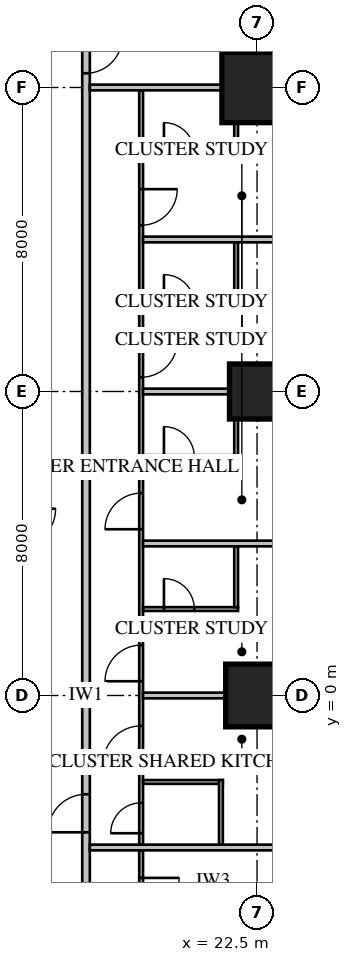
"""IFC4 building model, lengths in metres.
Left out: names, types, materials, properties, quantities, classifications, styles, units other than length and angle.
Written with IfcOpenShell. Run it as: python <this file> out.ifc"""

import sys

from ifc_helpers import new_model, si_unit, direction, frame, frame_2d, origin, origin_2d, place, context, subcontext, project, spatial, rectangle, extrude, element, fill, save


model = new_model("IFC4")
c1 = context("Model", 3, precision=1e-05, world=origin(), true_north=direction((0.0, 1.0)))
c2 = subcontext(c1, "Body", "Model", "MODEL_VIEW")
j1 = project(units=[si_unit("LENGTHUNIT", "METRE"), si_unit("PLANEANGLEUNIT", "RADIAN")], contexts=[c1])
p1 = place(None, origin())
s1 = spatial("IfcSite", under=j1, at=p1, CompositionType="ELEMENT")
p2 = place(p1, origin())
s2 = spatial("IfcBuilding", under=s1, at=p2, CompositionType="ELEMENT")
p3 = place(p2, frame((0.0, 0.0, 46.8)))
s3 = spatial("IfcBuildingStorey", under=s2, at=p3, CompositionType="ELEMENT", Elevation=46.8)
p4 = place(p3, frame((22.5, 0.0, 0.0), z_axis=(0.0, 0.0, 1.0), x_axis=(1.0, 0.0, 0.0)))
e1 = element("IfcColumn", 1, at=p4, inside=s3, PredefinedType="COLUMN", context=c2, shape_type="SweptSolid", body=[
    extrude(rectangle(XDim=1.65, YDim=1.65, at=origin_2d()), origin(), (0.0, 0.0, 1.0), 3.85),
])
p5 = place(p3, frame((22.5, 8.0, 0.0), z_axis=(0.0, 0.0, 1.0), x_axis=(1.0, 0.0, 0.0)))
e2 = element("IfcColumn", 2, at=p5, inside=s3, PredefinedType="COLUMN", context=c2, shape_type="SweptSolid", body=[
    extrude(rectangle(XDim=1.45, YDim=1.45, at=origin_2d()), origin(), (0.0, 0.0, 1.0), 3.85),
])
p6 = place(p3, frame((22.5, 16.0, 0.0), z_axis=(0.0, 0.0, 1.0), x_axis=(1.0, 0.0, 0.0)))
e3 = element("IfcColumn", 3, at=p6, inside=s3, PredefinedType="COLUMN", context=c2, shape_type="SweptSolid", body=[
    extrude(rectangle(XDim=1.85, YDim=1.85, at=origin_2d()), origin(), (0.0, 0.0, 1.0), 3.85),
])
p7 = place(p3, frame((18.0, -18.0, 0.0), z_axis=(0.0, 0.0, 1.0), x_axis=(0.0, 1.0, 0.0)))
e4 = element("IfcWall", 4, at=p7, inside=s3, PredefinedType="PARTITIONING", context=c2, shape_type="SweptSolid", body=[
    extrude(rectangle(XDim=36.0, YDim=0.2, at=frame_2d((18.0, 0.0))), origin(), (0.0, 0.0, 1.0), 3.65),
])
p8 = place(p7, frame((10.4, 0.0, 0.0)))
e5 = element("IfcOpeningElement", 5, at=p8, cuts=e4, PredefinedType="OPENING", context=c2, shape_type="SweptSolid", body=[
    extrude(rectangle(XDim=1.0, YDim=2.1, at=frame_2d((0.5, 1.05))), frame((0.0, 0.12, 0.0), z_axis=(0.0, -1.0, 0.0), x_axis=(1.0, 0.0, 0.0)), (0.0, 0.0, 1.0), 0.24),
])
p9 = place(p7, frame((14.4, 0.0, 0.0)))
e6 = element("IfcOpeningElement", 6, at=p9, cuts=e4, PredefinedType="OPENING", context=c2, shape_type="SweptSolid", body=[
    extrude(rectangle(XDim=1.0, YDim=2.1, at=frame_2d((0.5, 1.05))), frame((0.0, 0.12, 0.0), z_axis=(0.0, -1.0, 0.0), x_axis=(1.0, 0.0, 0.0)), (0.0, 0.0, 1.0), 0.24),
])
p10 = place(p7, frame((0.375, 0.0, 0.0)))
e7 = element("IfcOpeningElement", 7, at=p10, cuts=e4, PredefinedType="OPENING", context=c2, shape_type="SweptSolid", body=[
    extrude(rectangle(XDim=1.0, YDim=2.1, at=frame_2d((0.5, 1.05))), frame((0.0, 0.12, 0.0), z_axis=(0.0, -1.0, 0.0), x_axis=(1.0, 0.0, 0.0)), (0.0, 0.0, 1.0), 0.24),
])
p11 = place(p7, frame((34.375, 0.0, 0.0)))
e8 = element("IfcOpeningElement", 8, at=p11, cuts=e4, PredefinedType="OPENING", context=c2, shape_type="SweptSolid", body=[
    extrude(rectangle(XDim=0.95, YDim=2.1, at=frame_2d((0.475, 1.05))), frame((0.0, 0.12, 0.0), z_axis=(0.0, -1.0, 0.0), x_axis=(1.0, 0.0, 0.0)), (0.0, 0.0, 1.0), 0.24),
])
p12 = place(p3, frame((19.45, -15.925, 0.0), z_axis=(0.0, 0.0, 1.0), x_axis=(0.0, 1.0, 0.0)))
e9 = element("IfcWall", 9, at=p12, inside=s3, PredefinedType="PARTITIONING", context=c2, shape_type="SweptSolid", body=[
    extrude(rectangle(XDim=11.85, YDim=0.1, at=frame_2d((5.925, 0.0))), origin(), (0.0, 0.0, 1.0), 3.65),
])
p13 = place(p12, frame((10.125, 0.0, 0.0)))
e10 = element("IfcOpeningElement", 10, at=p13, cuts=e9, PredefinedType="OPENING", context=c2, shape_type="SweptSolid", body=[
    extrude(rectangle(XDim=1.0, YDim=2.1, at=frame_2d((0.5, 1.05))), frame((0.0, 0.07, 0.0), z_axis=(0.0, -1.0, 0.0), x_axis=(1.0, 0.0, 0.0)), (0.0, 0.0, 1.0), 0.14),
])
p14 = place(p12, frame((8.3, 0.0, 0.0)))
e11 = element("IfcOpeningElement", 11, at=p14, cuts=e9, PredefinedType="OPENING", context=c2, shape_type="SweptSolid", body=[
    extrude(rectangle(XDim=0.8, YDim=2.1, at=frame_2d((0.4, 1.05))), frame((0.0, 0.07, 0.0), z_axis=(0.0, -1.0, 0.0), x_axis=(1.0, 0.0, 0.0)), (0.0, 0.0, 1.0), 0.14),
])
p15 = place(p12, frame((0.3, 0.0, 0.0)))
e12 = element("IfcOpeningElement", 12, at=p15, cuts=e9, PredefinedType="OPENING", context=c2, shape_type="SweptSolid", body=[
    extrude(rectangle(XDim=0.95, YDim=2.1, at=frame_2d((0.475, 1.05))), frame((0.0, 0.07, 0.0), z_axis=(0.0, -1.0, 0.0), x_axis=(1.0, 0.0, 0.0)), (0.0, 0.0, 1.0), 0.14),
])
p16 = place(p12, frame((4.3, 0.0, 0.0)))
e13 = element("IfcOpeningElement", 13, at=p16, cuts=e9, PredefinedType="OPENING", context=c2, shape_type="SweptSolid", body=[
    extrude(rectangle(XDim=0.95, YDim=2.1, at=frame_2d((0.475, 1.05))), frame((0.0, 0.07, 0.0), z_axis=(0.0, -1.0, 0.0), x_axis=(1.0, 0.0, 0.0)), (0.0, 0.0, 1.0), 0.14),
])
p17 = place(p3, frame((19.45, -3.925, 0.0), z_axis=(0.0, 0.0, 1.0), x_axis=(0.0, 1.0, 0.0)))
e14 = element("IfcWall", 14, at=p17, inside=s3, PredefinedType="PARTITIONING", context=c2, shape_type="SweptSolid", body=[
    extrude(rectangle(XDim=19.85, YDim=0.1, at=frame_2d((9.925, 0.0))), origin(), (0.0, 0.0, 1.0), 3.65),
])
p18 = place(p17, frame((2.125, 0.0, 0.0)))
e15 = element("IfcOpeningElement", 15, at=p18, cuts=e14, PredefinedType="OPENING", context=c2, shape_type="SweptSolid", body=[
    extrude(rectangle(XDim=1.0, YDim=2.1, at=frame_2d((0.5, 1.05))), frame((0.0, 0.07, 0.0), z_axis=(0.0, -1.0, 0.0), x_axis=(1.0, 0.0, 0.0)), (0.0, 0.0, 1.0), 0.14),
])
p19 = place(p17, frame((0.3, 0.0, 0.0)))
e16 = element("IfcOpeningElement", 16, at=p19, cuts=e14, PredefinedType="OPENING", context=c2, shape_type="SweptSolid", body=[
    extrude(rectangle(XDim=0.8, YDim=2.1, at=frame_2d((0.4, 1.05))), frame((0.0, 0.07, 0.0), z_axis=(0.0, -1.0, 0.0), x_axis=(1.0, 0.0, 0.0)), (0.0, 0.0, 1.0), 0.14),
])
p20 = place(p17, frame((4.3, 0.0, 0.0)))
e17 = element("IfcOpeningElement", 17, at=p20, cuts=e14, PredefinedType="OPENING", context=c2, shape_type="SweptSolid", body=[
    extrude(rectangle(XDim=0.95, YDim=2.1, at=frame_2d((0.475, 1.05))), frame((0.0, 0.07, 0.0), z_axis=(0.0, -1.0, 0.0), x_axis=(1.0, 0.0, 0.0)), (0.0, 0.0, 1.0), 0.14),
])
p21 = place(p17, frame((8.3, 0.0, 0.0)))
e18 = element("IfcOpeningElement", 18, at=p21, cuts=e14, PredefinedType="OPENING", context=c2, shape_type="SweptSolid", body=[
    extrude(rectangle(XDim=0.95, YDim=2.1, at=frame_2d((0.475, 1.05))), frame((0.0, 0.07, 0.0), z_axis=(0.0, -1.0, 0.0), x_axis=(1.0, 0.0, 0.0)), (0.0, 0.0, 1.0), 0.14),
])
p22 = place(p17, frame((12.3, 0.0, 0.0)))
e19 = element("IfcOpeningElement", 19, at=p22, cuts=e14, PredefinedType="OPENING", context=c2, shape_type="SweptSolid", body=[
    extrude(rectangle(XDim=0.95, YDim=2.1, at=frame_2d((0.475, 1.05))), frame((0.0, 0.07, 0.0), z_axis=(0.0, -1.0, 0.0), x_axis=(1.0, 0.0, 0.0)), (0.0, 0.0, 1.0), 0.14),
])
p23 = place(p17, frame((16.3, 0.0, 0.0)))
e20 = element("IfcOpeningElement", 20, at=p23, cuts=e14, PredefinedType="OPENING", context=c2, shape_type="SweptSolid", body=[
    extrude(rectangle(XDim=0.95, YDim=2.1, at=frame_2d((0.475, 1.05))), frame((0.0, 0.07, 0.0), z_axis=(0.0, -1.0, 0.0), x_axis=(1.0, 0.0, 0.0)), (0.0, 0.0, 1.0), 0.14),
])
p24 = place(p3, frame((19.5, -2.275, 0.0), z_axis=(0.0, 0.0, 1.0), x_axis=(1.0, 0.0, 0.0)))
e21 = element("IfcWall", 21, at=p24, inside=s3, PredefinedType="PARTITIONING", context=c2, shape_type="SweptSolid", body=[
    extrude(rectangle(XDim=2.1, YDim=0.1, at=frame_2d((1.05, 0.0))), origin(), (0.0, 0.0, 1.0), 3.65),
])
p25 = place(p3, frame((21.55, -3.925, 0.0), z_axis=(0.0, 0.0, 1.0), x_axis=(0.0, 1.0, 0.0)))
e22 = element("IfcWall", 22, at=p25, inside=s3, PredefinedType="PARTITIONING", context=c2, shape_type="SweptSolid", body=[
    extrude(rectangle(XDim=1.7, YDim=0.1, at=frame_2d((0.85, 0.0))), origin(), (0.0, 0.0, 1.0), 3.65),
])
p26 = place(p3, frame((18.1, -4.0, 0.0), z_axis=(0.0, 0.0, 1.0), x_axis=(1.0, 0.0, 0.0)))
e23 = element("IfcWall", 23, at=p26, inside=s3, PredefinedType="PARTITIONING", context=c2, shape_type="SweptSolid", body=[
    extrude(rectangle(XDim=6.6, YDim=0.15, at=frame_2d((3.3, 0.0))), origin(), (0.0, 0.0, 1.0), 3.65),
])
p27 = place(p3, frame((19.5, 0.0, 0.0), z_axis=(0.0, 0.0, 1.0), x_axis=(1.0, 0.0, 0.0)))
e24 = element("IfcWall", 24, at=p27, inside=s3, PredefinedType="PARTITIONING", context=c2, shape_type="SweptSolid", body=[
    extrude(rectangle(XDim=5.2, YDim=0.15, at=frame_2d((2.6, 0.0))), origin(), (0.0, 0.0, 1.0), 2.957),
])
for number, where, z_axis, x_axis in (
    (25, (19.5, 4.0, 0.0), (0.0, 0.0, 1.0), (1.0, 0.0, 0.0)),
    (26, (19.5, 8.0, 0.0), (0.0, 0.0, 1.0), (1.0, 0.0, 0.0)),
    (27, (19.5, 12.0, 0.0), (0.0, 0.0, 1.0), (1.0, 0.0, 0.0)),
):
    element("IfcWall", number, at=place(p3, frame(where, z_axis=z_axis, x_axis=x_axis)), inside=s3, PredefinedType="PARTITIONING", context=c2, shape_type="SweptSolid", body=[
        extrude(rectangle(XDim=5.2, YDim=0.15, at=frame_2d((2.6, 0.0))), origin(), (0.0, 0.0, 1.0), 3.65),
    ])
p28 = place(p3, frame((18.1, 16.0, 0.0), z_axis=(0.0, 0.0, 1.0), x_axis=(1.0, 0.0, 0.0)))
e28 = element("IfcWall", 28, at=p28, inside=s3, PredefinedType="PARTITIONING", context=c2, shape_type="SweptSolid", body=[
    extrude(rectangle(XDim=6.589, YDim=0.15, at=frame_2d((3.295, 0.0))), origin(), (0.0, 0.0, 1.0), 3.65),
])
p29 = place(p3, frame((19.5, 2.275, 0.0), z_axis=(0.0, 0.0, 1.0), x_axis=(1.0, 0.0, 0.0)))
e29 = element("IfcWall", 29, at=p29, inside=s3, PredefinedType="PARTITIONING", context=c2, shape_type="SweptSolid", body=[
    extrude(rectangle(XDim=2.5, YDim=0.1, at=frame_2d((1.25, 0.0))), origin(), (0.0, 0.0, 1.0), 3.65),
])
p30 = place(p29, frame((0.55, 0.0, 0.0)))
e30 = element("IfcOpeningElement", 30, at=p30, cuts=e29, PredefinedType="OPENING", context=c2, shape_type="SweptSolid", body=[
    extrude(rectangle(XDim=0.8, YDim=2.1, at=frame_2d((0.4, 1.05))), frame((0.0, 0.07, 0.0), z_axis=(0.0, -1.0, 0.0), x_axis=(1.0, 0.0, 0.0)), (0.0, 0.0, 1.0), 0.14),
])
p31 = place(p3, frame((21.95, 2.325, 0.0), z_axis=(0.0, 0.0, 1.0), x_axis=(0.0, 1.0, 0.0)))
e31 = element("IfcWall", 31, at=p31, inside=s3, PredefinedType="PARTITIONING", context=c2, shape_type="SweptSolid", body=[
    extrude(rectangle(XDim=1.6, YDim=0.1, at=frame_2d((0.8, 0.0))), origin(), (0.0, 0.0, 1.0), 3.65),
])
p32 = place(p3, frame((19.5, 6.275, 0.0), z_axis=(0.0, 0.0, 1.0), x_axis=(1.0, 0.0, 0.0)))
e32 = element("IfcWall", 32, at=p32, inside=s3, PredefinedType="PARTITIONING", context=c2, shape_type="SweptSolid", body=[
    extrude(rectangle(XDim=2.5, YDim=0.1, at=frame_2d((1.25, 0.0))), origin(), (0.0, 0.0, 1.0), 3.65),
])
p33 = place(p32, frame((0.55, 0.0, 0.0)))
e33 = element("IfcOpeningElement", 33, at=p33, cuts=e32, PredefinedType="OPENING", context=c2, shape_type="SweptSolid", body=[
    extrude(rectangle(XDim=0.8, YDim=2.1, at=frame_2d((0.4, 1.05))), frame((0.0, 0.07, 0.0), z_axis=(0.0, -1.0, 0.0), x_axis=(1.0, 0.0, 0.0)), (0.0, 0.0, 1.0), 0.14),
])
p34 = place(p3, frame((21.95, 6.325, 0.0), z_axis=(0.0, 0.0, 1.0), x_axis=(0.0, 1.0, 0.0)))
e34 = element("IfcWall", 34, at=p34, inside=s3, PredefinedType="PARTITIONING", context=c2, shape_type="SweptSolid", body=[
    extrude(rectangle(XDim=1.6, YDim=0.1, at=frame_2d((0.8, 0.0))), origin(), (0.0, 0.0, 1.0), 3.65),
])
p35 = place(p3, frame((19.5, 10.275, 0.0), z_axis=(0.0, 0.0, 1.0), x_axis=(1.0, 0.0, 0.0)))
e35 = element("IfcWall", 35, at=p35, inside=s3, PredefinedType="PARTITIONING", context=c2, shape_type="SweptSolid", body=[
    extrude(rectangle(XDim=2.5, YDim=0.1, at=frame_2d((1.25, 0.0))), origin(), (0.0, 0.0, 1.0), 3.65),
])
p36 = place(p35, frame((0.55, 0.0, 0.0)))
e36 = element("IfcOpeningElement", 36, at=p36, cuts=e35, PredefinedType="OPENING", context=c2, shape_type="SweptSolid", body=[
    extrude(rectangle(XDim=0.8, YDim=2.1, at=frame_2d((0.4, 1.05))), frame((0.0, 0.07, 0.0), z_axis=(0.0, -1.0, 0.0), x_axis=(1.0, 0.0, 0.0)), (0.0, 0.0, 1.0), 0.14),
])
p37 = place(p3, frame((21.95, 10.325, 0.0), z_axis=(0.0, 0.0, 1.0), x_axis=(0.0, 1.0, 0.0)))
e37 = element("IfcWall", 37, at=p37, inside=s3, PredefinedType="PARTITIONING", context=c2, shape_type="SweptSolid", body=[
    extrude(rectangle(XDim=1.6, YDim=0.1, at=frame_2d((0.8, 0.0))), origin(), (0.0, 0.0, 1.0), 3.65),
])
p38 = place(p3, frame((19.5, 14.275, 0.0), z_axis=(0.0, 0.0, 1.0), x_axis=(1.0, 0.0, 0.0)))
e38 = element("IfcWall", 38, at=p38, inside=s3, PredefinedType="PARTITIONING", context=c2, shape_type="SweptSolid", body=[
    extrude(rectangle(XDim=2.5, YDim=0.1, at=frame_2d((1.25, 0.0))), origin(), (0.0, 0.0, 1.0), 3.65),
])
p39 = place(p38, frame((0.55, 0.0, 0.0)))
e39 = element("IfcOpeningElement", 39, at=p39, cuts=e38, PredefinedType="OPENING", context=c2, shape_type="SweptSolid", body=[
    extrude(rectangle(XDim=0.8, YDim=2.1, at=frame_2d((0.4, 1.05))), frame((0.0, 0.07, 0.0), z_axis=(0.0, -1.0, 0.0), x_axis=(1.0, 0.0, 0.0)), (0.0, 0.0, 1.0), 0.14),
])
p40 = place(p3, frame((21.95, 14.325, 0.0), z_axis=(0.0, 0.0, 1.0), x_axis=(0.0, 1.0, 0.0)))
e40 = element("IfcWall", 40, at=p40, inside=s3, PredefinedType="PARTITIONING", context=c2, shape_type="SweptSolid", body=[
    extrude(rectangle(XDim=1.6, YDim=0.1, at=frame_2d((0.8, 0.0))), origin(), (0.0, 0.0, 1.0), 3.65),
])
p41 = place(p13, origin())
e41 = element("IfcDoor", 41, at=p41, inside=s3, OperationType="SINGLE_SWING_RIGHT", PredefinedType="DOOR", context=c2, shape_type="SweptSolid", body=[
    extrude(rectangle(XDim=1.0, YDim=2.1, at=frame_2d((0.5, 1.05))), frame((0.0, 0.025, 0.0), z_axis=(0.0, -1.0, 0.0), x_axis=(1.0, 0.0, 0.0)), (0.0, 0.0, 1.0), 0.05),
])
fill(e10, e41)
p42 = place(p9, origin())
e42 = element("IfcDoor", 42, at=p42, inside=s3, OperationType="SINGLE_SWING_LEFT", PredefinedType="DOOR", context=c2, shape_type="SweptSolid", body=[
    extrude(rectangle(XDim=1.0, YDim=2.1, at=frame_2d((0.5, 1.05))), frame((0.0, 0.025, 0.0), z_axis=(0.0, -1.0, 0.0), x_axis=(1.0, 0.0, 0.0)), (0.0, 0.0, 1.0), 0.05),
])
fill(e6, e42)
p43 = place(p18, origin())
e43 = element("IfcDoor", 43, at=p43, inside=s3, OperationType="SINGLE_SWING_LEFT", PredefinedType="DOOR", context=c2, shape_type="SweptSolid", body=[
    extrude(rectangle(XDim=1.0, YDim=2.1, at=frame_2d((0.5, 1.05))), frame((0.0, 0.025, 0.0), z_axis=(0.0, -1.0, 0.0), x_axis=(1.0, 0.0, 0.0)), (0.0, 0.0, 1.0), 0.05),
])
fill(e15, e43)
p44 = place(p19, origin())
e44 = element("IfcDoor", 44, at=p44, inside=s3, OperationType="SINGLE_SWING_LEFT", PredefinedType="DOOR", context=c2, shape_type="SweptSolid", body=[
    extrude(rectangle(XDim=0.8, YDim=2.1, at=frame_2d((0.4, 1.05))), frame((0.0, 0.025, 0.0), z_axis=(0.0, -1.0, 0.0), x_axis=(1.0, 0.0, 0.0)), (0.0, 0.0, 1.0), 0.05),
])
fill(e16, e44)
p45 = place(p20, origin())
e45 = element("IfcDoor", 45, at=p45, inside=s3, OperationType="SINGLE_SWING_LEFT", PredefinedType="DOOR", context=c2, shape_type="SweptSolid", body=[
    extrude(rectangle(XDim=0.95, YDim=2.1, at=frame_2d((0.475, 1.05))), frame((0.0, 0.025, 0.0), z_axis=(0.0, -1.0, 0.0), x_axis=(1.0, 0.0, 0.0)), (0.0, 0.0, 1.0), 0.05),
])
fill(e17, e45)
p46 = place(p30, origin())
e46 = element("IfcDoor", 46, at=p46, inside=s3, OperationType="SINGLE_SWING_LEFT", PredefinedType="DOOR", context=c2, shape_type="SweptSolid", body=[
    extrude(rectangle(XDim=0.8, YDim=2.1, at=frame_2d((0.4, 1.05))), frame((0.0, 0.025, 0.0), z_axis=(0.0, -1.0, 0.0), x_axis=(1.0, 0.0, 0.0)), (0.0, 0.0, 1.0), 0.05),
])
fill(e30, e46)
p47 = place(p21, origin())
e47 = element("IfcDoor", 47, at=p47, inside=s3, OperationType="SINGLE_SWING_LEFT", PredefinedType="DOOR", context=c2, shape_type="SweptSolid", body=[
    extrude(rectangle(XDim=0.95, YDim=2.1, at=frame_2d((0.475, 1.05))), frame((0.0, 0.025, 0.0), z_axis=(0.0, -1.0, 0.0), x_axis=(1.0, 0.0, 0.0)), (0.0, 0.0, 1.0), 0.05),
])
fill(e18, e47)
p48 = place(p33, origin())
e48 = element("IfcDoor", 48, at=p48, inside=s3, OperationType="SINGLE_SWING_LEFT", PredefinedType="DOOR", context=c2, shape_type="SweptSolid", body=[
    extrude(rectangle(XDim=0.8, YDim=2.1, at=frame_2d((0.4, 1.05))), frame((0.0, 0.025, 0.0), z_axis=(0.0, -1.0, 0.0), x_axis=(1.0, 0.0, 0.0)), (0.0, 0.0, 1.0), 0.05),
])
fill(e33, e48)
p49 = place(p22, origin())
e49 = element("IfcDoor", 49, at=p49, inside=s3, OperationType="SINGLE_SWING_RIGHT", PredefinedType="DOOR", context=c2, shape_type="SweptSolid", body=[
    extrude(rectangle(XDim=0.95, YDim=2.1, at=frame_2d((0.475, 1.05))), frame((0.0, 0.025, 0.0), z_axis=(0.0, -1.0, 0.0), x_axis=(1.0, 0.0, 0.0)), (0.0, 0.0, 1.0), 0.05),
])
fill(e19, e49)
p50 = place(p36, origin())
e50 = element("IfcDoor", 50, at=p50, inside=s3, OperationType="SINGLE_SWING_LEFT", PredefinedType="DOOR", context=c2, shape_type="SweptSolid", body=[
    extrude(rectangle(XDim=0.8, YDim=2.1, at=frame_2d((0.4, 1.05))), frame((0.0, 0.025, 0.0), z_axis=(0.0, -1.0, 0.0), x_axis=(1.0, 0.0, 0.0)), (0.0, 0.0, 1.0), 0.05),
])
fill(e36, e50)
p51 = place(p23, origin())
e51 = element("IfcDoor", 51, at=p51, inside=s3, OperationType="SINGLE_SWING_RIGHT", PredefinedType="DOOR", context=c2, shape_type="SweptSolid", body=[
    extrude(rectangle(XDim=0.95, YDim=2.1, at=frame_2d((0.475, 1.05))), frame((0.0, 0.025, 0.0), z_axis=(0.0, -1.0, 0.0), x_axis=(1.0, 0.0, 0.0)), (0.0, 0.0, 1.0), 0.05),
])
fill(e20, e51)
p52 = place(p39, origin())
e52 = element("IfcDoor", 52, at=p52, inside=s3, OperationType="SINGLE_SWING_LEFT", PredefinedType="DOOR", context=c2, shape_type="SweptSolid", body=[
    extrude(rectangle(XDim=0.8, YDim=2.1, at=frame_2d((0.4, 1.05))), frame((0.0, 0.025, 0.0), z_axis=(0.0, -1.0, 0.0), x_axis=(1.0, 0.0, 0.0)), (0.0, 0.0, 1.0), 0.05),
])
fill(e39, e52)
p53 = place(p11, origin())
e53 = element("IfcDoor", 53, at=p53, inside=s3, OperationType="SINGLE_SWING_RIGHT", PredefinedType="DOOR", context=c2, shape_type="SweptSolid", body=[
    extrude(rectangle(XDim=0.95, YDim=2.1, at=frame_2d((0.475, 1.05))), frame((0.0, 0.025, 0.0), z_axis=(0.0, -1.0, 0.0), x_axis=(1.0, 0.0, 0.0)), (0.0, 0.0, 1.0), 0.05),
])
fill(e8, e53)
save(model, sys.argv[1])
